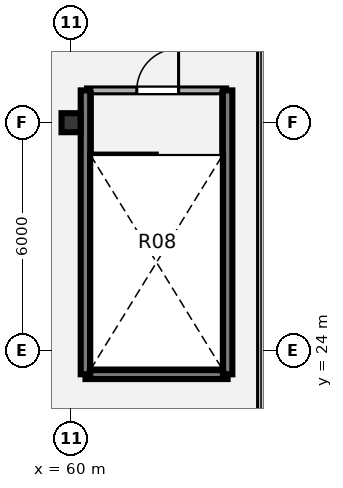
"""IFC4 building model, lengths in metres.
Left out: names, types, materials, properties, quantities, classifications, styles, units other than length and angle.
Written with IfcOpenShell. Run it as: python <this file> out.ifc"""

import sys

from ifc_helpers import new_model, si_unit, direction, frame, frame_2d, origin, origin_2d, place, context, subcontext, project, spatial, rectangle, i_section, extrude, source, transform, mapped, element, fill, save


model = new_model("IFC4")
c1 = context("Model", 3, precision=1e-05, world=origin(), true_north=direction((0.0, 1.0)))
c2 = subcontext(c1, "Body", "Model", "MODEL_VIEW")
j1 = project(units=[si_unit("LENGTHUNIT", "METRE"), si_unit("PLANEANGLEUNIT", "RADIAN")], contexts=[c1])
p1 = place(None, origin())
s1 = spatial("IfcSite", under=j1, at=p1, CompositionType="ELEMENT")
p2 = place(p1, origin())
s2 = spatial("IfcBuilding", under=s1, at=p2, CompositionType="ELEMENT")
p3 = place(p2, frame((0.0, 0.0, 22.68)))
s3 = spatial("IfcBuildingStorey", under=s2, at=p3, CompositionType="ELEMENT", Elevation=22.68)
m1 = source(origin(), c2, "Body", "SweptSolid", [
    extrude(i_section(OverallWidth=0.5, OverallDepth=0.5, WebThickness=0.022, FlangeThickness=0.035, at=origin_2d()), origin(), (0.0, 0.0, 1.0), 4.32),
])
p4 = place(p3, frame((60.0, 30.0, 0.0), z_axis=(0.0, 0.0, 1.0), x_axis=(1.0, 0.0, 0.0)))
e1 = element("IfcColumn", 1, at=p4, inside=s3, PredefinedType="COLUMN", context=c2, shape_type="MappedRepresentation", body=[
    mapped(m1, transform((0.0, 0.0, 0.0), x_axis=(1.0, 0.0, 0.0), y_axis=(0.0, 1.0, 0.0), z_axis=(0.0, 0.0, 1.0), scale=1.0)),
])
p5 = place(p3, frame((60.38, 30.85, 0.0), z_axis=(0.0, 0.0, 1.0), x_axis=(1.0, 0.0, 0.0)))
e2 = element("IfcWall", 2, at=p5, inside=s3, PredefinedType="PARTITIONING", context=c2, shape_type="SweptSolid", body=[
    extrude(rectangle(XDim=3.74, YDim=0.18, at=frame_2d((1.87, 0.0))), origin(), (0.0, 0.0, 1.0), 4.0),
])
p6 = place(p5, frame((1.35, 0.0, 0.0)))
e3 = element("IfcOpeningElement", 3, at=p6, cuts=e2, PredefinedType="OPENING", context=c2, shape_type="SweptSolid", body=[
    extrude(rectangle(XDim=1.1, YDim=2.1, at=origin_2d()), frame((0.55, 0.1, 1.05), z_axis=(0.0, -1.0, 0.0), x_axis=(1.0, 0.0, 0.0)), (0.0, 0.0, 1.0), 0.2),
])
p7 = place(p3, frame((60.38, 23.38, 0.0), z_axis=(0.0, 0.0, 1.0), x_axis=(1.0, 0.0, 0.0)))
e4 = element("IfcWall", 4, at=p7, inside=s3, PredefinedType="SHEAR", context=c2, shape_type="SweptSolid", body=[
    extrude(rectangle(XDim=3.74, YDim=0.25, at=frame_2d((1.87, 0.0))), origin(), (0.0, 0.0, 1.0), 4.32),
])
for number, where, z_axis, x_axis in (
    (5, (60.38, 23.38, 0.0), (0.0, 0.0, 1.0), (0.0, 1.0, 0.0)),
    (6, (64.12, 23.38, 0.0), (0.0, 0.0, 1.0), (0.0, 1.0, 0.0)),
):
    element("IfcWall", number, at=place(p3, frame(where, z_axis=z_axis, x_axis=x_axis)), inside=s3, PredefinedType="SHEAR", context=c2, shape_type="SweptSolid", body=[
        extrude(rectangle(XDim=7.47, YDim=0.25, at=frame_2d((3.735, 0.0))), origin(), (0.0, 0.0, 1.0), 4.32),
    ])
m2 = source(origin(), c2, "Body", "SweptSolid", [
    extrude(rectangle(XDim=1.1, YDim=2.1, at=origin_2d()), frame((0.55, 0.025, 1.05), z_axis=(0.0, -1.0, 0.0), x_axis=(1.0, 0.0, 0.0)), (0.0, 0.0, 1.0), 0.05),
])
p8 = place(p6, origin())
e7 = element("IfcDoor", 7, at=p8, inside=s3, OperationType="SINGLE_SWING_RIGHT", PredefinedType="DOOR", context=c2, shape_type="MappedRepresentation", body=[
    mapped(m2, transform((0.0, 0.0, 0.0), x_axis=(1.0, 0.0, 0.0), y_axis=(0.0, 1.0, 0.0), z_axis=(0.0, 0.0, 1.0), scale=1.0)),
])
fill(e3, e7)
save(model, sys.argv[1])
